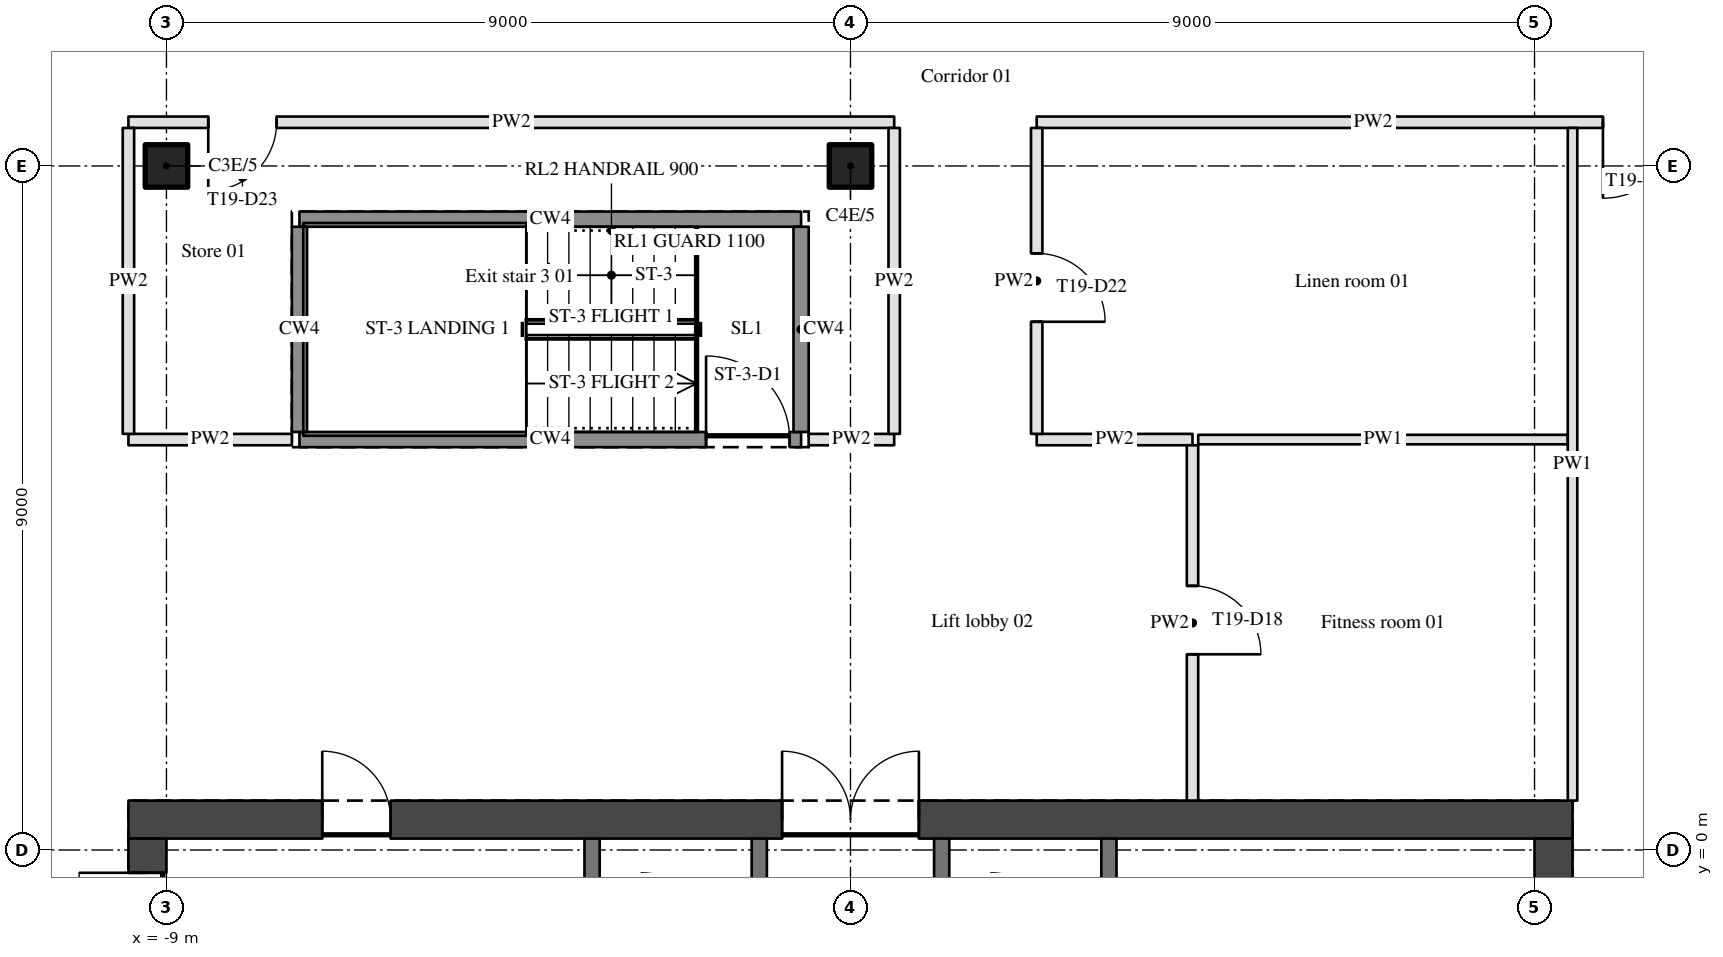
"""IFC4 building model, lengths in metres.
Left out: names, types, materials, properties, quantities, classifications, styles, units other than length and angle.
Written with IfcOpenShell. Run it as: python <this file> out.ifc"""

import sys

from ifc_helpers import new_model, si_unit, direction, frame, frame_2d, origin, origin_2d, place, context, subcontext, project, spatial, rectangle, hollow_circle, extrude, element, fill, save


model = new_model("IFC4")
c1 = context("Model", 3, precision=1e-05, world=origin(), true_north=direction((0.0, 1.0)))
c2 = subcontext(c1, "Body", "Model", "MODEL_VIEW")
j1 = project(units=[si_unit("LENGTHUNIT", "METRE"), si_unit("PLANEANGLEUNIT", "RADIAN")], contexts=[c1])
p1 = place(None, origin())
s1 = spatial("IfcSite", under=j1, at=p1, CompositionType="ELEMENT")
p2 = place(p1, origin())
s2 = spatial("IfcBuilding", under=s1, at=p2, CompositionType="ELEMENT")
p3 = place(p2, frame((0.0, 0.0, 251.85)))
s3 = spatial("IfcBuildingStorey", under=s2, at=p3, CompositionType="ELEMENT", Elevation=251.85)
for number, where, z_axis, x_axis in (
    (1, (-9.0, 9.0, 0.0), (0.0, 0.0, 1.0), (1.0, 0.0, 0.0)),
    (2, (0.0, 9.0, 0.0), (0.0, 0.0, 1.0), (1.0, 0.0, 0.0)),
):
    element("IfcColumn", number, at=place(p3, frame(where, z_axis=z_axis, x_axis=x_axis)), inside=s3, PredefinedType="COLUMN", context=c2, shape_type="SweptSolid", body=[
        extrude(hollow_circle(Radius=0.28, WallThickness=0.025, at=origin_2d()), origin(), (0.0, 0.0, 1.0), 3.15),
    ])
p4 = place(p3, frame((-9.5, 0.4, 0.0), z_axis=(0.0, 0.0, 1.0), x_axis=(1.0, 0.0, 0.0)))
e3 = element("IfcWall", 3, at=p4, inside=s3, PredefinedType="SHEAR", context=c2, shape_type="SweptSolid", body=[
    extrude(rectangle(XDim=19.0, YDim=0.5, at=frame_2d((9.5, 0.0))), origin(), (0.0, 0.0, 1.0), 3.15),
])
p5 = place(p4, frame((8.6, 0.0, 0.0)))
e4 = element("IfcOpeningElement", 4, at=p5, cuts=e3, PredefinedType="OPENING", context=c2, shape_type="SweptSolid", body=[
    extrude(rectangle(XDim=1.8, YDim=2.1, at=frame_2d((0.9, 1.05))), frame((0.0, 0.26, 0.0), z_axis=(0.0, -1.0, 0.0), x_axis=(1.0, 0.0, 0.0)), (0.0, 0.0, 1.0), 0.52),
])
p6 = place(p4, frame((2.55, 0.0, 0.0)))
e5 = element("IfcOpeningElement", 5, at=p6, cuts=e3, PredefinedType="OPENING", context=c2, shape_type="SweptSolid", body=[
    extrude(rectangle(XDim=0.9, YDim=2.1, at=frame_2d((0.45, 1.05))), frame((0.0, 0.26, 0.0), z_axis=(0.0, -1.0, 0.0), x_axis=(1.0, 0.0, 0.0)), (0.0, 0.0, 1.0), 0.52),
])
p7 = place(p3, frame((-9.25, -11.5, 0.0), z_axis=(0.0, 0.0, 1.0), x_axis=(0.0, 1.0, 0.0)))
e6 = element("IfcWall", 6, at=p7, inside=s3, PredefinedType="SHEAR", context=c2, shape_type="SweptSolid", body=[
    extrude(rectangle(XDim=11.65, YDim=0.5, at=frame_2d((5.825, 0.0))), origin(), (0.0, 0.0, 1.0), 3.15),
])
p8 = place(p7, frame((9.4, 0.0, 0.0)))
e7 = element("IfcOpeningElement", 7, at=p8, cuts=e6, PredefinedType="OPENING", context=c2, shape_type="SweptSolid", body=[
    extrude(rectangle(XDim=1.8, YDim=2.1, at=frame_2d((0.9, 1.05))), frame((0.0, 0.26, 0.0), z_axis=(0.0, -1.0, 0.0), x_axis=(1.0, 0.0, 0.0)), (0.0, 0.0, 1.0), 0.52),
])
p9 = place(p3, frame((9.25, -11.5, 0.0), z_axis=(0.0, 0.0, 1.0), x_axis=(0.0, 1.0, 0.0)))
e8 = element("IfcWall", 8, at=p9, inside=s3, PredefinedType="SHEAR", context=c2, shape_type="SweptSolid", body=[
    extrude(rectangle(XDim=11.65, YDim=0.5, at=frame_2d((5.825, 0.0))), origin(), (0.0, 0.0, 1.0), 3.15),
])
p10 = place(p3, frame((-9.5, 5.4, 0.0), z_axis=(0.0, 0.0, 1.0), x_axis=(1.0, 0.0, 0.0)))
e9 = element("IfcWall", 9, at=p10, inside=s3, PredefinedType="PARTITIONING", context=c2, shape_type="SweptSolid", body=[
    extrude(rectangle(XDim=2.15, YDim=0.15, at=frame_2d((1.075, 0.0))), origin(), (0.0, 0.0, 1.0), 2.21),
])
p11 = place(p3, frame((-7.25, 5.4, 0.0), z_axis=(0.0, 0.0, 1.0), x_axis=(1.0, 0.0, 0.0)))
e10 = element("IfcWall", 10, at=p11, inside=s3, PredefinedType="SHEAR", context=c2, shape_type="SweptSolid", body=[
    extrude(rectangle(XDim=6.6, YDim=0.2, at=frame_2d((3.3, 0.0))), origin(), (0.0, 0.0, 1.0), 3.15),
])
p12 = place(p11, frame((5.35, 0.0, 0.0)))
e11 = element("IfcOpeningElement", 11, at=p12, cuts=e10, PredefinedType="OPENING", context=c2, shape_type="SweptSolid", body=[
    extrude(rectangle(XDim=1.1, YDim=2.1, at=frame_2d((0.55, 1.05))), frame((0.0, 0.11, 0.0), z_axis=(0.0, -1.0, 0.0), x_axis=(1.0, 0.0, 0.0)), (0.0, 0.0, 1.0), 0.22),
])
p13 = place(p3, frame((-0.55, 5.4, 0.0), z_axis=(0.0, 0.0, 1.0), x_axis=(1.0, 0.0, 0.0)))
e12 = element("IfcWall", 12, at=p13, inside=s3, PredefinedType="PARTITIONING", context=c2, shape_type="SweptSolid", body=[
    extrude(rectangle(XDim=1.125, YDim=0.15, at=frame_2d((0.562, 0.0))), origin(), (0.0, 0.0, 1.0), 2.21),
])
p14 = place(p3, frame((2.45, 5.4, 0.0), z_axis=(0.0, 0.0, 1.0), x_axis=(1.0, 0.0, 0.0)))
e13 = element("IfcWall", 13, at=p14, inside=s3, PredefinedType="PARTITIONING", context=c2, shape_type="SweptSolid", body=[
    extrude(rectangle(XDim=2.05, YDim=0.15, at=frame_2d((1.025, 0.0))), origin(), (0.0, 0.0, 1.0), 2.21),
])
p15 = place(p3, frame((4.575, 5.4, 0.0), z_axis=(0.0, 0.0, 1.0), x_axis=(1.0, 0.0, 0.0)))
e14 = element("IfcWall", 14, at=p15, inside=s3, PredefinedType="PARTITIONING", context=c2, shape_type="SweptSolid", body=[
    extrude(rectangle(XDim=4.863, YDim=0.125, at=frame_2d((2.431, 0.0))), origin(), (0.0, 0.0, 1.0), 2.21),
])
p16 = place(p3, frame((-7.25, 8.3, 0.0), z_axis=(0.0, 0.0, 1.0), x_axis=(1.0, 0.0, 0.0)))
e15 = element("IfcWall", 15, at=p16, inside=s3, PredefinedType="SHEAR", context=c2, shape_type="SweptSolid", body=[
    extrude(rectangle(XDim=6.6, YDim=0.2, at=frame_2d((3.3, 0.0))), origin(), (0.0, 0.0, 1.0), 3.15),
])
p17 = place(p3, frame((0.575, 9.575, 0.0), z_axis=(0.0, 0.0, 1.0), x_axis=(-1.0, 0.0, 0.0)))
e16 = element("IfcWall", 16, at=p17, inside=s3, PredefinedType="PARTITIONING", context=c2, shape_type="SweptSolid", body=[
    extrude(rectangle(XDim=10.075, YDim=0.15, at=frame_2d((5.038, 0.0))), origin(), (0.0, 0.0, 1.0), 2.21),
])
p18 = place(p17, frame((8.125, 0.0, 0.0)))
e17 = element("IfcOpeningElement", 17, at=p18, cuts=e16, PredefinedType="OPENING", context=c2, shape_type="SweptSolid", body=[
    extrude(rectangle(XDim=0.9, YDim=2.1, at=frame_2d((0.45, 1.05))), frame((0.0, 0.085, 0.0), z_axis=(0.0, -1.0, 0.0), x_axis=(1.0, 0.0, 0.0)), (0.0, 0.0, 1.0), 0.17),
])
p19 = place(p3, frame((11.3, 9.575, 0.0), z_axis=(0.0, 0.0, 1.0), x_axis=(-1.0, 0.0, 0.0)))
e18 = element("IfcWall", 18, at=p19, inside=s3, PredefinedType="PARTITIONING", context=c2, shape_type="SweptSolid", body=[
    extrude(rectangle(XDim=8.85, YDim=0.15, at=frame_2d((4.425, 0.0))), origin(), (0.0, 0.0, 1.0), 2.21),
])
p20 = place(p19, frame((0.4, 0.0, 0.0)))
e19 = element("IfcOpeningElement", 19, at=p20, cuts=e18, PredefinedType="OPENING", context=c2, shape_type="SweptSolid", body=[
    extrude(rectangle(XDim=1.0, YDim=2.1, at=frame_2d((0.5, 1.05))), frame((0.0, 0.085, 0.0), z_axis=(0.0, -1.0, 0.0), x_axis=(1.0, 0.0, 0.0)), (0.0, 0.0, 1.0), 0.17),
])
p21 = place(p3, frame((-9.5, 5.475, 0.0), z_axis=(0.0, 0.0, 1.0), x_axis=(0.0, 1.0, 0.0)))
e20 = element("IfcWall", 20, at=p21, inside=s3, PredefinedType="PARTITIONING", context=c2, shape_type="SweptSolid", body=[
    extrude(rectangle(XDim=4.025, YDim=0.15, at=frame_2d((2.012, 0.0))), origin(), (0.0, 0.0, 1.0), 2.21),
])
p22 = place(p3, frame((-7.25, 5.5, 0.0), z_axis=(0.0, 0.0, 1.0), x_axis=(0.0, 1.0, 0.0)))
e21 = element("IfcWall", 21, at=p22, inside=s3, PredefinedType="SHEAR", context=c2, shape_type="SweptSolid", body=[
    extrude(rectangle(XDim=2.7, YDim=0.2, at=frame_2d((1.35, 0.0))), origin(), (0.0, 0.0, 1.0), 3.15),
])
for number, where, z_axis, x_axis in (
    (22, (-3.4, -1.1, 0.0), (0.0, 0.0, 1.0), (0.0, 1.0, 0.0)),
    (23, (-1.2, -1.1, 0.0), (0.0, 0.0, 1.0), (0.0, 1.0, 0.0)),
):
    element("IfcWall", number, at=place(p3, frame(where, z_axis=z_axis, x_axis=x_axis)), inside=s3, PredefinedType="SOLIDWALL", context=c2, shape_type="SweptSolid", body=[
        extrude(rectangle(XDim=1.25, YDim=0.2, at=frame_2d((0.625, 0.0))), origin(), (0.0, 0.0, 1.0), 2.85),
    ])
p23 = place(p3, frame((-0.65, 5.5, 0.0), z_axis=(0.0, 0.0, 1.0), x_axis=(0.0, 1.0, 0.0)))
e24 = element("IfcWall", 24, at=p23, inside=s3, PredefinedType="SHEAR", context=c2, shape_type="SweptSolid", body=[
    extrude(rectangle(XDim=2.7, YDim=0.2, at=frame_2d((1.35, 0.0))), origin(), (0.0, 0.0, 1.0), 3.15),
])
p24 = place(p3, frame((0.575, 5.475, 0.0), z_axis=(0.0, 0.0, 1.0), x_axis=(0.0, 1.0, 0.0)))
e25 = element("IfcWall", 25, at=p24, inside=s3, PredefinedType="PARTITIONING", context=c2, shape_type="SweptSolid", body=[
    extrude(rectangle(XDim=4.025, YDim=0.15, at=frame_2d((2.012, 0.0))), origin(), (0.0, 0.0, 1.0), 2.21),
])
p25 = place(p3, frame((1.2, -1.1, 0.0), z_axis=(0.0, 0.0, 1.0), x_axis=(0.0, 1.0, 0.0)))
e26 = element("IfcWall", 26, at=p25, inside=s3, PredefinedType="SOLIDWALL", context=c2, shape_type="SweptSolid", body=[
    extrude(rectangle(XDim=1.25, YDim=0.2, at=frame_2d((0.625, 0.0))), origin(), (0.0, 0.0, 1.0), 2.85),
])
p26 = place(p3, frame((2.45, 9.5, 0.0), z_axis=(0.0, 0.0, 1.0), x_axis=(0.0, -1.0, 0.0)))
e27 = element("IfcWall", 27, at=p26, inside=s3, PredefinedType="PARTITIONING", context=c2, shape_type="SweptSolid", body=[
    extrude(rectangle(XDim=4.025, YDim=0.15, at=frame_2d((2.012, 0.0))), origin(), (0.0, 0.0, 1.0), 2.21),
])
p27 = place(p26, frame((1.65, 0.0, 0.0)))
e28 = element("IfcOpeningElement", 28, at=p27, cuts=e27, PredefinedType="OPENING", context=c2, shape_type="SweptSolid", body=[
    extrude(rectangle(XDim=0.9, YDim=2.1, at=frame_2d((0.45, 1.05))), frame((0.0, 0.085, 0.0), z_axis=(0.0, -1.0, 0.0), x_axis=(1.0, 0.0, 0.0)), (0.0, 0.0, 1.0), 0.17),
])
p28 = place(p3, frame((3.4, -1.1, 0.0), z_axis=(0.0, 0.0, 1.0), x_axis=(0.0, 1.0, 0.0)))
e29 = element("IfcWall", 29, at=p28, inside=s3, PredefinedType="SOLIDWALL", context=c2, shape_type="SweptSolid", body=[
    extrude(rectangle(XDim=1.25, YDim=0.2, at=frame_2d((0.625, 0.0))), origin(), (0.0, 0.0, 1.0), 2.85),
])
p29 = place(p3, frame((4.5, 5.325, 0.0), z_axis=(0.0, 0.0, 1.0), x_axis=(0.0, -1.0, 0.0)))
e30 = element("IfcWall", 30, at=p29, inside=s3, PredefinedType="PARTITIONING", context=c2, shape_type="SweptSolid", body=[
    extrude(rectangle(XDim=4.675, YDim=0.15, at=frame_2d((2.337, 0.0))), origin(), (0.0, 0.0, 1.0), 2.21),
])
p30 = place(p29, frame((1.85, 0.0, 0.0)))
e31 = element("IfcOpeningElement", 31, at=p30, cuts=e30, PredefinedType="OPENING", context=c2, shape_type="SweptSolid", body=[
    extrude(rectangle(XDim=0.9, YDim=2.1, at=frame_2d((0.45, 1.05))), frame((0.0, 0.085, 0.0), z_axis=(0.0, -1.0, 0.0), x_axis=(1.0, 0.0, 0.0)), (0.0, 0.0, 1.0), 0.17),
])
p31 = place(p3, frame((9.5, 0.65, 0.0), z_axis=(0.0, 0.0, 1.0), x_axis=(0.0, 1.0, 0.0)))
e32 = element("IfcWall", 32, at=p31, inside=s3, PredefinedType="PARTITIONING", context=c2, shape_type="SweptSolid", body=[
    extrude(rectangle(XDim=8.85, YDim=0.125, at=frame_2d((4.425, 0.0))), origin(), (0.0, 0.0, 1.0), 2.21),
])
p32 = place(p8, origin())
e33 = element("IfcDoor", 33, at=p32, inside=s3, OperationType="DOUBLE_DOOR_SINGLE_SWING", PredefinedType="DOOR", context=c2, shape_type="SweptSolid", body=[
    extrude(rectangle(XDim=1.8, YDim=2.1, at=frame_2d((0.9, 1.05))), frame((0.0, 0.025, 0.0), z_axis=(0.0, -1.0, 0.0), x_axis=(1.0, 0.0, 0.0)), (0.0, 0.0, 1.0), 0.05),
])
fill(e7, e33)
p33 = place(p5, origin())
e34 = element("IfcDoor", 34, at=p33, inside=s3, OperationType="DOUBLE_DOOR_SINGLE_SWING", PredefinedType="DOOR", context=c2, shape_type="SweptSolid", body=[
    extrude(rectangle(XDim=1.8, YDim=2.1, at=frame_2d((0.9, 1.05))), frame((0.0, 0.025, 0.0), z_axis=(0.0, -1.0, 0.0), x_axis=(1.0, 0.0, 0.0)), (0.0, 0.0, 1.0), 0.05),
])
fill(e4, e34)
p34 = place(p12, origin())
e35 = element("IfcDoor", 35, at=p34, inside=s3, OperationType="SINGLE_SWING_LEFT", PredefinedType="DOOR", context=c2, shape_type="SweptSolid", body=[
    extrude(rectangle(XDim=1.1, YDim=2.1, at=frame_2d((0.55, 1.05))), frame((0.0, 0.025, 0.0), z_axis=(0.0, -1.0, 0.0), x_axis=(1.0, 0.0, 0.0)), (0.0, 0.0, 1.0), 0.05),
])
fill(e11, e35)
p35 = place(p27, origin())
e36 = element("IfcDoor", 36, at=p35, inside=s3, OperationType="SINGLE_SWING_RIGHT", PredefinedType="DOOR", context=c2, shape_type="SweptSolid", body=[
    extrude(rectangle(XDim=0.9, YDim=2.1, at=frame_2d((0.45, 1.05))), frame((0.0, 0.025, 0.0), z_axis=(0.0, -1.0, 0.0), x_axis=(1.0, 0.0, 0.0)), (0.0, 0.0, 1.0), 0.05),
])
fill(e28, e36)
p36 = place(p20, origin())
e37 = element("IfcDoor", 37, at=p36, inside=s3, OperationType="SINGLE_SWING_RIGHT", PredefinedType="DOOR", context=c2, shape_type="SweptSolid", body=[
    extrude(rectangle(XDim=1.0, YDim=2.1, at=frame_2d((0.5, 1.05))), frame((0.0, 0.025, 0.0), z_axis=(0.0, -1.0, 0.0), x_axis=(1.0, 0.0, 0.0)), (0.0, 0.0, 1.0), 0.05),
])
fill(e19, e37)
p37 = place(p18, origin())
e38 = element("IfcDoor", 38, at=p37, inside=s3, OperationType="SINGLE_SWING_RIGHT", PredefinedType="DOOR", context=c2, shape_type="SweptSolid", body=[
    extrude(rectangle(XDim=0.9, YDim=2.1, at=frame_2d((0.45, 1.05))), frame((0.0, 0.025, 0.0), z_axis=(0.0, -1.0, 0.0), x_axis=(1.0, 0.0, 0.0)), (0.0, 0.0, 1.0), 0.05),
])
fill(e17, e38)
p38 = place(p30, origin())
e39 = element("IfcDoor", 39, at=p38, inside=s3, OperationType="SINGLE_SWING_RIGHT", PredefinedType="DOOR", context=c2, shape_type="SweptSolid", body=[
    extrude(rectangle(XDim=0.9, YDim=2.1, at=frame_2d((0.45, 1.05))), frame((0.0, 0.025, 0.0), z_axis=(0.0, -1.0, 0.0), x_axis=(1.0, 0.0, 0.0)), (0.0, 0.0, 1.0), 0.05),
])
fill(e31, e39)
p39 = place(p6, origin())
e40 = element("IfcDoor", 40, at=p39, inside=s3, OperationType="SINGLE_SWING_LEFT", PredefinedType="DOOR", context=c2, shape_type="SweptSolid", body=[
    extrude(rectangle(XDim=0.9, YDim=2.1, at=frame_2d((0.45, 1.05))), frame((0.0, 0.025, 0.0), z_axis=(0.0, -1.0, 0.0), x_axis=(1.0, 0.0, 0.0)), (0.0, 0.0, 1.0), 0.05),
])
fill(e5, e40)
save(model, sys.argv[1])
